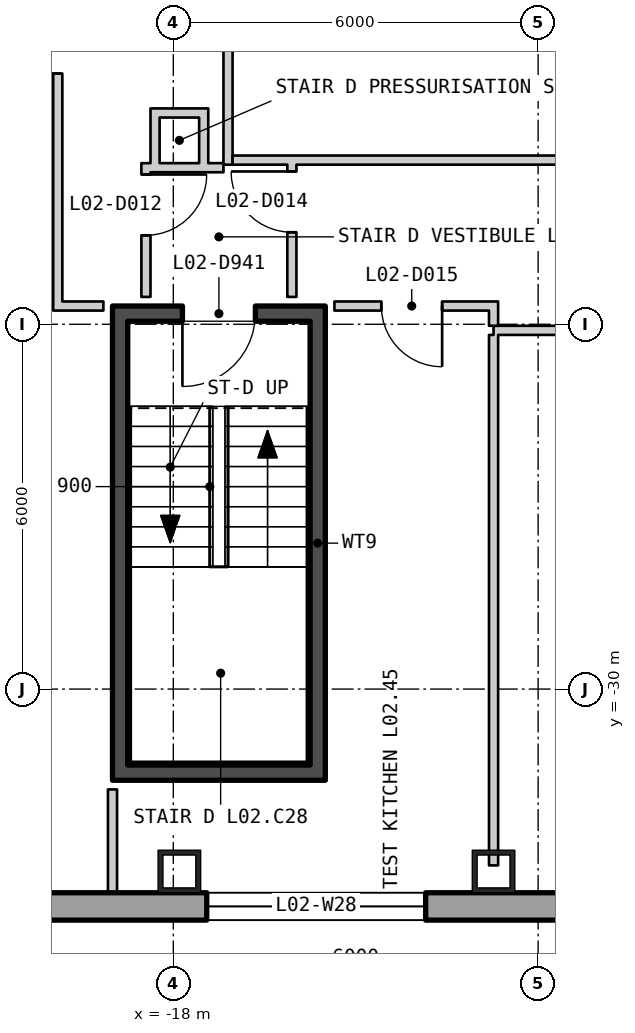
"""IFC4 building model, lengths in metres.
Left out: names, types, materials, properties, quantities, classifications, styles, units other than length and angle.
Written with IfcOpenShell. Run it as: python <this file> out.ifc"""

import sys

from ifc_helpers import new_model, si_unit, direction, frame, frame_2d, origin, origin_2d, place, context, subcontext, project, spatial, polyline, rectangle, hollow_rectangle, outline, extrude, element, fill, save


model = new_model("IFC4")
c1 = context("Model", 3, precision=1e-05, world=origin(), true_north=direction((0.0, 1.0)))
c2 = subcontext(c1, "Body", "Model", "MODEL_VIEW")
j1 = project(units=[si_unit("LENGTHUNIT", "METRE"), si_unit("PLANEANGLEUNIT", "RADIAN")], contexts=[c1])
p1 = place(None, origin())
s1 = spatial("IfcSite", under=j1, at=p1, CompositionType="ELEMENT")
p2 = place(p1, origin())
s2 = spatial("IfcBuilding", under=s1, at=p2, CompositionType="ELEMENT")
p3 = place(p2, frame((0.0, 0.0, 13.5)))
s3 = spatial("IfcBuildingStorey", under=s2, at=p3, CompositionType="ELEMENT", Elevation=13.5)
for number, where, z_axis, x_axis in (
    (1, (-17.9, -33.0, 0.0), (0.0, 0.0, 1.0), (1.0, 0.0, 0.0)),
    (2, (-12.733, -33.0, 0.0), (0.0, 0.0, 1.0), (1.0, 0.0, 0.0)),
):
    element("IfcColumn", number, at=place(p3, frame(where, z_axis=z_axis, x_axis=x_axis)), inside=s3, PredefinedType="COLUMN", context=c2, shape_type="SweptSolid", body=[
        extrude(hollow_rectangle(XDim=0.7, YDim=0.7, WallThickness=0.08, at=origin_2d()), origin(), (0.0, 0.0, 1.0), 5.1),
    ])
p4 = place(p3, frame((-38.775, -33.575, -0.4), z_axis=(0.0, 0.0, 1.0), x_axis=(1.0, 0.0, 0.0)))
e3 = element("IfcWall", 3, at=p4, inside=s3, PredefinedType="SOLIDWALL", context=c2, shape_type="SweptSolid", body=[
    extrude(outline(polyline([(-0.225, -0.225), (77.775, -0.225), (77.325, 0.225), (0.225, 0.225), (-0.225, -0.225)])), origin(), (0.0, 0.0, 1.0), 5.1),
])
p5 = place(p4, frame((1.958, 0.0, 1.3)))
e4 = element("IfcOpeningElement", 4, at=p5, cuts=e3, PredefinedType="OPENING", context=c2, shape_type="SweptSolid", body=[
    extrude(rectangle(XDim=3.6, YDim=3.2, at=frame_2d((1.8, 1.6))), frame((0.0, 0.235, 0.0), z_axis=(0.0, -1.0, 0.0), x_axis=(1.0, 0.0, 0.0)), (0.0, 0.0, 1.0), 0.47),
])
p6 = place(p4, frame((8.325, 0.0, 1.3)))
e5 = element("IfcOpeningElement", 5, at=p6, cuts=e3, PredefinedType="OPENING", context=c2, shape_type="SweptSolid", body=[
    extrude(rectangle(XDim=3.6, YDim=3.2, at=frame_2d((1.8, 1.6))), frame((0.0, 0.235, 0.0), z_axis=(0.0, -1.0, 0.0), x_axis=(1.0, 0.0, 0.0)), (0.0, 0.0, 1.0), 0.47),
])
p7 = place(p4, frame((14.692, 0.0, 1.3)))
e6 = element("IfcOpeningElement", 6, at=p7, cuts=e3, PredefinedType="OPENING", context=c2, shape_type="SweptSolid", body=[
    extrude(rectangle(XDim=3.6, YDim=3.2, at=frame_2d((1.8, 1.6))), frame((0.0, 0.235, 0.0), z_axis=(0.0, -1.0, 0.0), x_axis=(1.0, 0.0, 0.0)), (0.0, 0.0, 1.0), 0.47),
])
p8 = place(p4, frame((21.325, 0.0, 1.3)))
e7 = element("IfcOpeningElement", 7, at=p8, cuts=e3, PredefinedType="OPENING", context=c2, shape_type="SweptSolid", body=[
    extrude(rectangle(XDim=3.6, YDim=3.2, at=frame_2d((1.8, 1.6))), frame((0.0, 0.235, 0.0), z_axis=(0.0, -1.0, 0.0), x_axis=(1.0, 0.0, 0.0)), (0.0, 0.0, 1.0), 0.47),
])
p9 = place(p4, frame((27.425, 0.0, 1.3)))
e8 = element("IfcOpeningElement", 8, at=p9, cuts=e3, PredefinedType="OPENING", context=c2, shape_type="SweptSolid", body=[
    extrude(rectangle(XDim=3.6, YDim=3.2, at=frame_2d((1.8, 1.6))), frame((0.0, 0.235, 0.0), z_axis=(0.0, -1.0, 0.0), x_axis=(1.0, 0.0, 0.0)), (0.0, 0.0, 1.0), 0.47),
])
p10 = place(p4, frame((33.792, 0.0, 1.3)))
e9 = element("IfcOpeningElement", 9, at=p10, cuts=e3, PredefinedType="OPENING", context=c2, shape_type="SweptSolid", body=[
    extrude(rectangle(XDim=3.6, YDim=3.2, at=frame_2d((1.8, 1.6))), frame((0.0, 0.235, 0.0), z_axis=(0.0, -1.0, 0.0), x_axis=(1.0, 0.0, 0.0)), (0.0, 0.0, 1.0), 0.47),
])
p11 = place(p4, frame((40.158, 0.0, 1.3)))
e10 = element("IfcOpeningElement", 10, at=p11, cuts=e3, PredefinedType="OPENING", context=c2, shape_type="SweptSolid", body=[
    extrude(rectangle(XDim=3.6, YDim=3.2, at=frame_2d((1.8, 1.6))), frame((0.0, 0.235, 0.0), z_axis=(0.0, -1.0, 0.0), x_axis=(1.0, 0.0, 0.0)), (0.0, 0.0, 1.0), 0.47),
])
p12 = place(p4, frame((46.525, 0.0, 1.3)))
e11 = element("IfcOpeningElement", 11, at=p12, cuts=e3, PredefinedType="OPENING", context=c2, shape_type="SweptSolid", body=[
    extrude(rectangle(XDim=3.6, YDim=3.2, at=frame_2d((1.8, 1.6))), frame((0.0, 0.235, 0.0), z_axis=(0.0, -1.0, 0.0), x_axis=(1.0, 0.0, 0.0)), (0.0, 0.0, 1.0), 0.47),
])
p13 = place(p4, frame((52.625, 0.0, 1.3)))
e12 = element("IfcOpeningElement", 12, at=p13, cuts=e3, PredefinedType="OPENING", context=c2, shape_type="SweptSolid", body=[
    extrude(rectangle(XDim=3.6, YDim=3.2, at=frame_2d((1.8, 1.6))), frame((0.0, 0.235, 0.0), z_axis=(0.0, -1.0, 0.0), x_axis=(1.0, 0.0, 0.0)), (0.0, 0.0, 1.0), 0.47),
])
p14 = place(p4, frame((59.258, 0.0, 1.3)))
e13 = element("IfcOpeningElement", 13, at=p14, cuts=e3, PredefinedType="OPENING", context=c2, shape_type="SweptSolid", body=[
    extrude(rectangle(XDim=3.6, YDim=3.2, at=frame_2d((1.8, 1.6))), frame((0.0, 0.235, 0.0), z_axis=(0.0, -1.0, 0.0), x_axis=(1.0, 0.0, 0.0)), (0.0, 0.0, 1.0), 0.47),
])
p15 = place(p4, frame((65.625, 0.0, 1.3)))
e14 = element("IfcOpeningElement", 14, at=p15, cuts=e3, PredefinedType="OPENING", context=c2, shape_type="SweptSolid", body=[
    extrude(rectangle(XDim=3.6, YDim=3.2, at=frame_2d((1.8, 1.6))), frame((0.0, 0.235, 0.0), z_axis=(0.0, -1.0, 0.0), x_axis=(1.0, 0.0, 0.0)), (0.0, 0.0, 1.0), 0.47),
])
p16 = place(p4, frame((71.992, 0.0, 1.3)))
e15 = element("IfcOpeningElement", 15, at=p16, cuts=e3, PredefinedType="OPENING", context=c2, shape_type="SweptSolid", body=[
    extrude(rectangle(XDim=3.6, YDim=3.2, at=frame_2d((1.8, 1.6))), frame((0.0, 0.235, 0.0), z_axis=(0.0, -1.0, 0.0), x_axis=(1.0, 0.0, 0.0)), (0.0, 0.0, 1.0), 0.47),
])
for number, where, z_axis, x_axis in (
    (16, (-18.875, -31.25, 0.0), (0.0, 0.0, 1.0), (0.0, 1.0, 0.0)),
    (17, (-15.625, -31.25, 0.0), (0.0, 0.0, 1.0), (0.0, 1.0, 0.0)),
):
    element("IfcWall", number, at=place(p3, frame(where, z_axis=z_axis, x_axis=x_axis)), inside=s3, PredefinedType="SHEAR", context=c2, shape_type="SweptSolid", body=[
        extrude(rectangle(XDim=7.3, YDim=0.25, at=frame_2d((3.65, 0.0))), origin(), (0.0, 0.0, 1.0), 4.88),
    ])
p17 = place(p3, frame((-19.0, -31.375, 0.0), z_axis=(0.0, 0.0, 1.0), x_axis=(1.0, 0.0, 0.0)))
e18 = element("IfcWall", 18, at=p17, inside=s3, PredefinedType="SHEAR", context=c2, shape_type="SweptSolid", body=[
    extrude(rectangle(XDim=3.5, YDim=0.25, at=frame_2d((1.75, 0.0))), origin(), (0.0, 0.0, 1.0), 4.88),
])
p18 = place(p3, frame((-19.0, -23.825, 0.0), z_axis=(0.0, 0.0, 1.0), x_axis=(1.0, 0.0, 0.0)))
e19 = element("IfcWall", 19, at=p18, inside=s3, PredefinedType="SHEAR", context=c2, shape_type="SweptSolid", body=[
    extrude(rectangle(XDim=3.5, YDim=0.25, at=frame_2d((1.75, 0.0))), origin(), (0.0, 0.0, 1.0), 4.88),
])
p19 = place(p18, frame((1.15, 0.0, 0.0)))
e20 = element("IfcOpeningElement", 20, at=p19, cuts=e19, PredefinedType="OPENING", context=c2, shape_type="SweptSolid", body=[
    extrude(rectangle(XDim=1.2, YDim=2.1, at=frame_2d((0.6, 1.05))), frame((0.0, 0.135, 0.0), z_axis=(0.0, -1.0, 0.0), x_axis=(1.0, 0.0, 0.0)), (0.0, 0.0, 1.0), 0.27),
])
p20 = place(p3, frame((-25.027, -19.825, 0.0), z_axis=(0.0, 0.0, 1.0), x_axis=(0.707106781187, 0.707106781187, 0.0)))
e21 = element("IfcWall", 21, at=p20, inside=s3, PredefinedType="PARTITIONING", context=c2, shape_type="SweptSolid", body=[
    extrude(rectangle(XDim=7.07, YDim=0.15, at=frame_2d((3.535, 0.0))), origin(), (0.0, 0.0, 1.0), 4.88),
])
p21 = place(p3, frame((-19.9, -23.775, 0.0), z_axis=(0.0, 0.0, 1.0), x_axis=(0.0, 1.0, 0.0)))
e22 = element("IfcWall", 22, at=p21, inside=s3, PredefinedType="PARTITIONING", context=c2, shape_type="SweptSolid", body=[
    extrude(rectangle(XDim=21.187, YDim=0.15, at=frame_2d((10.594, 0.0))), origin(), (0.0, 0.0, 1.0), 4.88),
])
p22 = place(p21, frame((3.898, 0.0, 0.0)))
e23 = element("IfcOpeningElement", 23, at=p22, cuts=e22, PredefinedType="OPENING", context=c2, shape_type="SweptSolid", body=[
    extrude(rectangle(XDim=1.0, YDim=2.1, at=frame_2d((0.5, 1.05))), frame((0.0, 0.085, 0.0), z_axis=(0.0, -1.0, 0.0), x_axis=(1.0, 0.0, 0.0)), (0.0, 0.0, 1.0), 0.17),
])
p23 = place(p21, frame((10.832, 0.0, 0.0)))
e24 = element("IfcOpeningElement", 24, at=p23, cuts=e22, PredefinedType="OPENING", context=c2, shape_type="SweptSolid", body=[
    extrude(rectangle(XDim=1.0, YDim=2.1, at=frame_2d((0.5, 1.05))), frame((0.0, 0.085, 0.0), z_axis=(0.0, -1.0, 0.0), x_axis=(1.0, 0.0, 0.0)), (0.0, 0.0, 1.0), 0.17),
])
p24 = place(p21, frame((14.688, 0.0, 0.0)))
e25 = element("IfcOpeningElement", 25, at=p24, cuts=e22, PredefinedType="OPENING", context=c2, shape_type="SweptSolid", body=[
    extrude(rectangle(XDim=1.0, YDim=2.1, at=frame_2d((0.5, 1.05))), frame((0.0, 0.085, 0.0), z_axis=(0.0, -1.0, 0.0), x_axis=(1.0, 0.0, 0.0)), (0.0, 0.0, 1.0), 0.17),
])
p25 = place(p3, frame((-19.825, -23.7, 0.0), z_axis=(0.0, 0.0, 1.0), x_axis=(1.0, 0.0, 0.0)))
e26 = element("IfcWall", 26, at=p25, inside=s3, PredefinedType="PARTITIONING", context=c2, shape_type="SweptSolid", body=[
    extrude(rectangle(XDim=0.675, YDim=0.15, at=frame_2d((0.338, 0.0))), origin(), (0.0, 0.0, 1.0), 4.88),
])
p26 = place(p3, frame((-19.0, -33.348, 0.0), z_axis=(0.0, 0.0, 1.0), x_axis=(0.0, 1.0, 0.0)))
e27 = element("IfcWall", 27, at=p26, inside=s3, PredefinedType="PARTITIONING", context=c2, shape_type="SweptSolid", body=[
    extrude(rectangle(XDim=0.448, YDim=0.15, at=frame_2d((0.224, 0.0))), origin(), (0.0, 0.0, 1.0), 4.88),
])
p27 = place(p3, frame((-19.0, -32.9, 0.0), z_axis=(0.0, 0.0, 1.0), x_axis=(0.0, 1.0, 0.0)))
e28 = element("IfcWall", 28, at=p27, inside=s3, PredefinedType="PARTITIONING", context=c2, shape_type="SweptSolid", body=[
    extrude(rectangle(XDim=1.25, YDim=0.15, at=frame_2d((0.625, 0.0))), origin(), (0.0, 0.0, 1.0), 4.19),
])
p28 = place(p3, frame((-18.45, -23.55, 0.0), z_axis=(0.0, 0.0, 1.0), x_axis=(0.0, 1.0, 0.0)))
e29 = element("IfcWall", 29, at=p28, inside=s3, PredefinedType="PARTITIONING", context=c2, shape_type="SweptSolid", body=[
    extrude(rectangle(XDim=2.2, YDim=0.15, at=frame_2d((1.1, 0.0))), origin(), (0.0, 0.0, 1.0), 4.88),
])
p29 = place(p28, frame((1.013, 0.0, 0.0)))
e30 = element("IfcOpeningElement", 30, at=p29, cuts=e29, PredefinedType="OPENING", context=c2, shape_type="SweptSolid", body=[
    extrude(rectangle(XDim=1.0, YDim=2.1, at=frame_2d((0.5, 1.05))), frame((0.0, 0.085, 0.0), z_axis=(0.0, -1.0, 0.0), x_axis=(1.0, 0.0, 0.0)), (0.0, 0.0, 1.0), 0.17),
])
p30 = place(p3, frame((-18.3, -21.5, 0.0), z_axis=(0.0, 0.0, 1.0), x_axis=(0.0, 1.0, 0.0)))
e31 = element("IfcWall", 31, at=p30, inside=s3, PredefinedType="PARTITIONING", context=c2, shape_type="SweptSolid", body=[
    extrude(rectangle(XDim=1.05, YDim=0.15, at=frame_2d((0.525, 0.0))), origin(), (0.0, 0.0, 1.0), 4.88),
])
for number, where, z_axis, x_axis in (
    (32, (-18.225, -21.425, 0.0), (0.0, 0.0, 1.0), (1.0, 0.0, 0.0)),
    (33, (-18.225, -20.525, 0.0), (0.0, 0.0, 1.0), (1.0, 0.0, 0.0)),
):
    element("IfcWall", number, at=place(p3, frame(where, z_axis=z_axis, x_axis=x_axis)), inside=s3, PredefinedType="PARTITIONING", context=c2, shape_type="SweptSolid", body=[
        extrude(rectangle(XDim=0.65, YDim=0.15, at=frame_2d((0.325, 0.0))), origin(), (0.0, 0.0, 1.0), 4.88),
    ])
p31 = place(p3, frame((-17.5, -21.5, 0.0), z_axis=(0.0, 0.0, 1.0), x_axis=(0.0, 1.0, 0.0)))
e34 = element("IfcWall", 34, at=p31, inside=s3, PredefinedType="PARTITIONING", context=c2, shape_type="SweptSolid", body=[
    extrude(rectangle(XDim=1.05, YDim=0.15, at=frame_2d((0.525, 0.0))), origin(), (0.0, 0.0, 1.0), 4.88),
])
p32 = place(p3, frame((-17.425, -21.425, 0.0), z_axis=(0.0, 0.0, 1.0), x_axis=(1.0, 0.0, 0.0)))
e35 = element("IfcWall", 35, at=p32, inside=s3, PredefinedType="PARTITIONING", context=c2, shape_type="SweptSolid", body=[
    extrude(rectangle(XDim=0.25, YDim=0.15, at=frame_2d((0.125, 0.0))), origin(), (0.0, 0.0, 1.0), 4.88),
])
p33 = place(p3, frame((-17.1, -21.375, 0.0), z_axis=(0.0, 0.0, 1.0), x_axis=(0.0, 1.0, 0.0)))
e36 = element("IfcWall", 36, at=p33, inside=s3, PredefinedType="PARTITIONING", context=c2, shape_type="SweptSolid", body=[
    extrude(rectangle(XDim=19.05, YDim=0.15, at=frame_2d((9.525, 0.0))), origin(), (0.0, 0.0, 1.0), 4.88),
])
p34 = place(p3, frame((-17.025, -21.3, 0.0), z_axis=(0.0, 0.0, 1.0), x_axis=(1.0, 0.0, 0.0)))
e37 = element("IfcWall", 37, at=p34, inside=s3, PredefinedType="PARTITIONING", context=c2, shape_type="SweptSolid", body=[
    extrude(rectangle(XDim=10.654, YDim=0.15, at=frame_2d((5.327, 0.0))), origin(), (0.0, 0.0, 1.0), 4.88),
])
p35 = place(p3, frame((-16.05, -23.55, 0.0), z_axis=(0.0, 0.0, 1.0), x_axis=(0.0, 1.0, 0.0)))
e38 = element("IfcWall", 38, at=p35, inside=s3, PredefinedType="PARTITIONING", context=c2, shape_type="SweptSolid", body=[
    extrude(rectangle(XDim=2.175, YDim=0.15, at=frame_2d((1.087, 0.0))), origin(), (0.0, 0.0, 1.0), 4.88),
])
p36 = place(p35, frame((1.063, 0.0, 0.0)))
e39 = element("IfcOpeningElement", 39, at=p36, cuts=e38, PredefinedType="OPENING", context=c2, shape_type="SweptSolid", body=[
    extrude(rectangle(XDim=1.0, YDim=2.1, at=frame_2d((0.5, 1.05))), frame((0.0, 0.085, 0.0), z_axis=(0.0, -1.0, 0.0), x_axis=(1.0, 0.0, 0.0)), (0.0, 0.0, 1.0), 0.17),
])
p37 = place(p3, frame((-15.35, -23.7, 0.0), z_axis=(0.0, 0.0, 1.0), x_axis=(1.0, 0.0, 0.0)))
e40 = element("IfcWall", 40, at=p37, inside=s3, PredefinedType="PARTITIONING", context=c2, shape_type="SweptSolid", body=[
    extrude(rectangle(XDim=2.542, YDim=0.15, at=frame_2d((1.271, 0.0))), origin(), (0.0, 0.0, 1.0), 4.88),
])
p38 = place(p37, frame((0.771, 0.0, 0.0)))
e41 = element("IfcOpeningElement", 41, at=p38, cuts=e40, PredefinedType="OPENING", context=c2, shape_type="SweptSolid", body=[
    extrude(rectangle(XDim=1.0, YDim=2.1, at=frame_2d((0.5, 1.05))), frame((0.0, 0.085, 0.0), z_axis=(0.0, -1.0, 0.0), x_axis=(1.0, 0.0, 0.0)), (0.0, 0.0, 1.0), 0.17),
])
p39 = place(p3, frame((-12.733, -32.9, 0.0), z_axis=(0.0, 0.0, 1.0), x_axis=(0.0, 1.0, 0.0)))
e42 = element("IfcWall", 42, at=p39, inside=s3, PredefinedType="PARTITIONING", context=c2, shape_type="SweptSolid", body=[
    extrude(rectangle(XDim=8.725, YDim=0.15, at=frame_2d((4.362, 0.0))), origin(), (0.0, 0.0, 1.0), 4.19),
])
p40 = place(p3, frame((-12.733, -24.1, 0.0), z_axis=(0.0, 0.0, 1.0), x_axis=(1.0, 0.0, 0.0)))
e43 = element("IfcWall", 43, at=p40, inside=s3, PredefinedType="PARTITIONING", context=c2, shape_type="SweptSolid", body=[
    extrude(rectangle(XDim=19.1, YDim=0.15, at=frame_2d((9.55, 0.0))), origin(), (0.0, 0.0, 1.0), 4.88),
])
p41 = place(p40, frame((8.907, 0.0, 0.0)))
e44 = element("IfcOpeningElement", 44, at=p41, cuts=e43, PredefinedType="OPENING", context=c2, shape_type="SweptSolid", body=[
    extrude(rectangle(XDim=1.0, YDim=2.1, at=frame_2d((0.5, 1.05))), frame((0.0, 0.085, 0.0), z_axis=(0.0, -1.0, 0.0), x_axis=(1.0, 0.0, 0.0)), (0.0, 0.0, 1.0), 0.17),
])
p42 = place(p3, frame((-12.733, -24.025, 0.0), z_axis=(0.0, 0.0, 1.0), x_axis=(0.0, 1.0, 0.0)))
e45 = element("IfcWall", 45, at=p42, inside=s3, PredefinedType="PARTITIONING", context=c2, shape_type="SweptSolid", body=[
    extrude(rectangle(XDim=0.4, YDim=0.15, at=frame_2d((0.2, 0.0))), origin(), (0.0, 0.0, 1.0), 4.88),
])
p43 = place(p8, origin())
e46 = element("IfcWindow", 46, at=p43, inside=s3, PartitioningType="SINGLE_PANEL", PredefinedType="WINDOW", context=c2, shape_type="SweptSolid", body=[
    extrude(rectangle(XDim=3.6, YDim=3.2, at=frame_2d((1.8, 1.6))), frame((0.0, 0.105, 0.0), z_axis=(0.0, -1.0, 0.0), x_axis=(1.0, 0.0, 0.0)), (0.0, 0.0, 1.0), 0.06),
])
fill(e7, e46)
p44 = place(p19, origin())
e47 = element("IfcDoor", 47, at=p44, inside=s3, OperationType="SINGLE_SWING_LEFT", PredefinedType="DOOR", context=c2, shape_type="SweptSolid", body=[
    extrude(rectangle(XDim=1.2, YDim=2.1, at=frame_2d((0.6, 1.05))), frame((0.0, 0.025, 0.0), z_axis=(0.0, -1.0, 0.0), x_axis=(1.0, 0.0, 0.0)), (0.0, 0.0, 1.0), 0.05),
])
fill(e20, e47)
p45 = place(p22, origin())
e48 = element("IfcDoor", 48, at=p45, inside=s3, OperationType="SINGLE_SWING_RIGHT", PredefinedType="DOOR", context=c2, shape_type="SweptSolid", body=[
    extrude(rectangle(XDim=1.0, YDim=2.1, at=frame_2d((0.5, 1.05))), frame((0.0, 0.025, 0.0), z_axis=(0.0, -1.0, 0.0), x_axis=(1.0, 0.0, 0.0)), (0.0, 0.0, 1.0), 0.05),
])
fill(e23, e48)
p46 = place(p29, origin())
e49 = element("IfcDoor", 49, at=p46, inside=s3, OperationType="SINGLE_SWING_RIGHT", PredefinedType="DOOR", context=c2, shape_type="SweptSolid", body=[
    extrude(rectangle(XDim=1.0, YDim=2.1, at=frame_2d((0.5, 1.05))), frame((0.0, 0.025, 0.0), z_axis=(0.0, -1.0, 0.0), x_axis=(1.0, 0.0, 0.0)), (0.0, 0.0, 1.0), 0.05),
])
fill(e30, e49)
p47 = place(p36, origin())
e50 = element("IfcDoor", 50, at=p47, inside=s3, OperationType="SINGLE_SWING_LEFT", PredefinedType="DOOR", context=c2, shape_type="SweptSolid", body=[
    extrude(rectangle(XDim=1.0, YDim=2.1, at=frame_2d((0.5, 1.05))), frame((0.0, 0.025, 0.0), z_axis=(0.0, -1.0, 0.0), x_axis=(1.0, 0.0, 0.0)), (0.0, 0.0, 1.0), 0.05),
])
fill(e39, e50)
p48 = place(p38, origin())
e51 = element("IfcDoor", 51, at=p48, inside=s3, OperationType="SINGLE_SWING_RIGHT", PredefinedType="DOOR", context=c2, shape_type="SweptSolid", body=[
    extrude(rectangle(XDim=1.0, YDim=2.1, at=frame_2d((0.5, 1.05))), frame((0.0, 0.025, 0.0), z_axis=(0.0, -1.0, 0.0), x_axis=(1.0, 0.0, 0.0)), (0.0, 0.0, 1.0), 0.05),
])
fill(e41, e51)
save(model, sys.argv[1])
